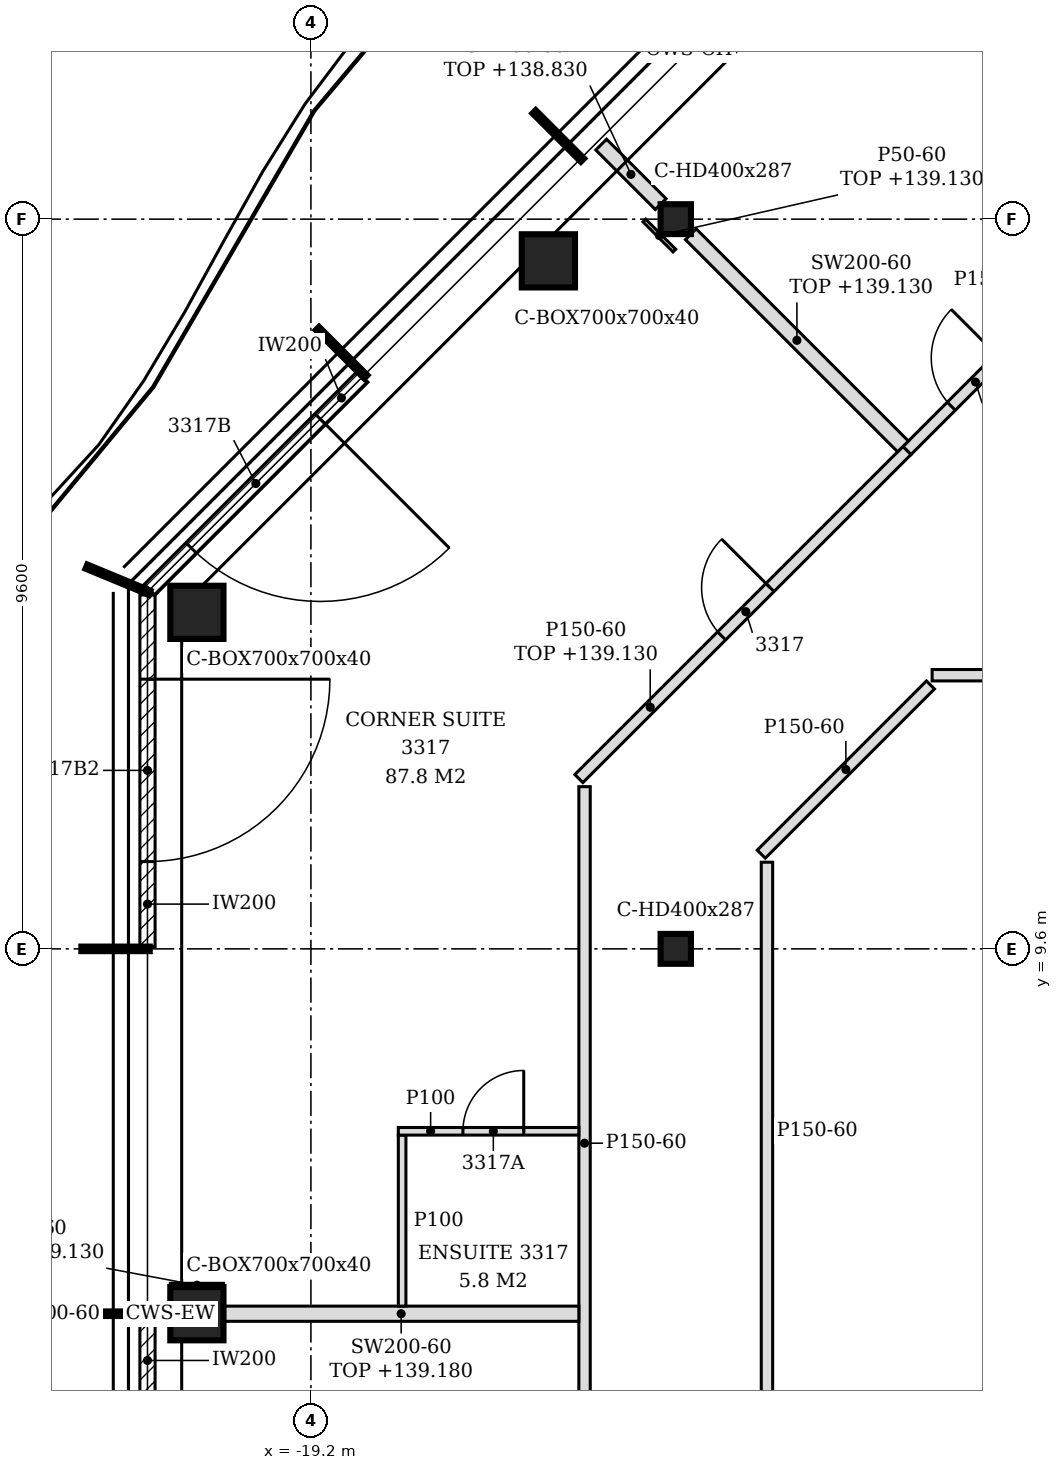
"""IFC4 building model, lengths in metres.
Left out: names, types, materials, properties, quantities, classifications, styles, units other than length and angle.
Written with IfcOpenShell. Run it as: python <this file> out.ifc"""

import sys

from ifc_helpers import new_model, si_unit, direction, frame, frame_2d, origin, origin_2d, place, context, subcontext, project, spatial, polyline, rectangle, hollow_rectangle, i_section, outline, extrude, element, fill, save


model = new_model("IFC4")
c1 = context("Model", 3, precision=1e-05, world=origin(), true_north=direction((0.0, 1.0)))
c2 = subcontext(c1, "Body", "Model", "MODEL_VIEW")
j1 = project(units=[si_unit("LENGTHUNIT", "METRE"), si_unit("PLANEANGLEUNIT", "RADIAN")], contexts=[c1])
p1 = place(None, origin())
s1 = spatial("IfcSite", under=j1, at=p1, CompositionType="ELEMENT")
p2 = place(p1, origin())
s2 = spatial("IfcBuilding", under=s1, at=p2, CompositionType="ELEMENT")
p3 = place(p2, frame((0.0, 0.0, 136.2)))
s3 = spatial("IfcBuildingStorey", under=s2, at=p3, CompositionType="ELEMENT", Elevation=136.2)
for number, where, z_axis, x_axis in (
    (1, (-16.076, 18.652, -0.15), (0.0, 0.0, 1.0), (1.0, 0.0, 0.0)),
    (2, (-20.7, 14.027, -0.15), (0.0, 0.0, 1.0), (1.0, 0.0, 0.0)),
    (3, (-20.7, 4.8, -0.15), (0.0, 0.0, 1.0), (1.0, 0.0, 0.0)),
):
    element("IfcColumn", number, at=place(p3, frame(where, z_axis=z_axis, x_axis=x_axis)), inside=s3, PredefinedType="COLUMN", context=c2, shape_type="SweptSolid", body=[
        extrude(hollow_rectangle(XDim=0.7, YDim=0.7, WallThickness=0.04, at=origin_2d()), origin(), (0.0, 0.0, 1.0), 3.6),
    ])
for number, where, z_axis, x_axis in (
    (4, (-14.4, 9.6, -0.15), (0.0, 0.0, 1.0), (1.0, 0.0, 0.0)),
    (5, (-14.4, 19.2, -0.15), (0.0, 0.0, 1.0), (1.0, 0.0, 0.0)),
):
    element("IfcColumn", number, at=place(p3, frame(where, z_axis=z_axis, x_axis=x_axis)), inside=s3, PredefinedType="COLUMN", context=c2, shape_type="SweptSolid", body=[
        extrude(i_section(OverallWidth=0.399, OverallDepth=0.393, WebThickness=0.023, FlangeThickness=0.037, FilletRadius=0.015, at=origin_2d()), origin(), (0.0, 0.0, 1.0), 3.6),
    ])
p4 = place(p3, frame((-18.521, 17.126, 0.0), z_axis=(0.0, 0.0, 1.0), x_axis=(-0.707106781187, -0.707106781187, 0.0)))
e6 = element("IfcWall", 6, at=p4, inside=s3, PredefinedType="NOTDEFINED", context=c2, shape_type="SweptSolid", body=[
    extrude(rectangle(XDim=3.962, YDim=0.2, at=frame_2d((1.981, 0.0))), origin(), (0.0, 0.0, 1.0), 3.45),
])
p5 = place(p4, frame((0.786, 0.0, 0.0)))
e7 = element("IfcOpeningElement", 7, at=p5, cuts=e6, PredefinedType="OPENING", context=c2, shape_type="SweptSolid", body=[
    extrude(rectangle(XDim=2.4, YDim=2.4, at=frame_2d((1.2, 1.2))), frame((0.0, 0.11, 0.0), z_axis=(0.0, -1.0, 0.0), x_axis=(1.0, 0.0, 0.0)), (0.0, 0.0, 1.0), 0.22),
])
p6 = place(p3, frame((-21.35, 14.256, 0.0), z_axis=(0.0, 0.0, 1.0), x_axis=(0.0, -1.0, 0.0)))
e8 = element("IfcWall", 8, at=p6, inside=s3, PredefinedType="NOTDEFINED", context=c2, shape_type="SweptSolid", body=[
    extrude(rectangle(XDim=4.626, YDim=0.2, at=frame_2d((2.313, 0.0))), origin(), (0.0, 0.0, 1.0), 3.45),
])
p7 = place(p6, frame((1.108, 0.0, 0.0)))
e9 = element("IfcOpeningElement", 9, at=p7, cuts=e8, PredefinedType="OPENING", context=c2, shape_type="SweptSolid", body=[
    extrude(rectangle(XDim=2.4, YDim=2.4, at=frame_2d((1.2, 1.2))), frame((0.0, 0.11, 0.0), z_axis=(0.0, -1.0, 0.0), x_axis=(1.0, 0.0, 0.0)), (0.0, 0.0, 1.0), 0.22),
])
p8 = place(p3, frame((-21.35, 4.77, 0.0), z_axis=(0.0, 0.0, 1.0), x_axis=(0.0, -1.0, 0.0)))
e10 = element("IfcWall", 10, at=p8, inside=s3, PredefinedType="NOTDEFINED", context=c2, shape_type="SweptSolid", body=[
    extrude(rectangle(XDim=4.74, YDim=0.2, at=frame_2d((2.37, 0.0))), origin(), (0.0, 0.0, 1.0), 3.45),
])
p9 = place(p8, frame((1.17, 0.0, 0.0)))
e11 = element("IfcOpeningElement", 11, at=p9, cuts=e10, PredefinedType="OPENING", context=c2, shape_type="SweptSolid", body=[
    extrude(rectangle(XDim=2.4, YDim=2.4, at=frame_2d((1.2, 1.2))), frame((0.0, 0.11, 0.0), z_axis=(0.0, -1.0, 0.0), x_axis=(1.0, 0.0, 0.0)), (0.0, 0.0, 1.0), 0.22),
])
p10 = place(p3, frame((-15.6, -1.1, 0.0), z_axis=(0.0, 0.0, 1.0), x_axis=(0.0, 1.0, 0.0)))
e12 = element("IfcWall", 12, at=p10, inside=s3, PredefinedType="PARTITIONING", context=c2, shape_type="SweptSolid", body=[
    extrude(outline(polyline([(0.0, 0.0), (12.834, 0.0), (12.834, 3.45), (10.795, 3.45), (10.793, 2.98), (10.605, 2.98), (10.603, 3.45), (5.995, 3.45), (5.993, 2.98), (5.805, 2.98), (5.803, 3.45), (1.195, 3.45), (1.193, 2.98), (1.005, 2.98), (1.003, 3.45), (0.0, 3.45), (0.0, 0.0)])), frame((0.0, 0.075, 0.0), z_axis=(0.0, -1.0, 0.0), x_axis=(1.0, 0.0, 0.0)), (0.0, 0.0, 1.0), 0.15),
])
p11 = place(p10, frame((2.553, 0.0, 0.0)))
e13 = element("IfcOpeningElement", 13, at=p11, cuts=e12, PredefinedType="OPENING", context=c2, shape_type="SweptSolid", body=[
    extrude(rectangle(XDim=0.9, YDim=2.1, at=frame_2d((0.45, 1.05))), frame((0.0, 0.085, 0.0), z_axis=(0.0, -1.0, 0.0), x_axis=(1.0, 0.0, 0.0)), (0.0, 0.0, 1.0), 0.17),
])
p12 = place(p3, frame((-13.2, 3.675, 0.0), z_axis=(0.0, 0.0, 1.0), x_axis=(0.0, 1.0, 0.0)))
e14 = element("IfcWall", 14, at=p12, inside=s3, PredefinedType="PARTITIONING", context=c2, shape_type="SweptSolid", body=[
    extrude(outline(polyline([(0.0, 0.0), (7.065, 0.0), (7.065, 3.45), (6.025, 3.45), (6.023, 2.93), (5.825, 2.93), (5.823, 3.45), (1.225, 3.45), (1.223, 2.93), (1.025, 2.93), (1.023, 3.45), (0.0, 3.45), (0.0, 0.0)])), frame((0.0, 0.075, 0.0), z_axis=(0.0, -1.0, 0.0), x_axis=(1.0, 0.0, 0.0)), (0.0, 0.0, 1.0), 0.15),
])
p13 = place(p3, frame((-21.25, 4.8, 0.0), z_axis=(0.0, 0.0, 1.0), x_axis=(1.0, 0.0, 0.0)))
e15 = element("IfcWall", 15, at=p13, inside=s3, PredefinedType="PARTITIONING", context=c2, shape_type="SweptSolid", body=[
    extrude(rectangle(XDim=0.2, YDim=0.2, at=frame_2d((0.1, 0.0))), origin(), (0.0, 0.0, 1.0), 3.45),
])
p14 = place(p3, frame((-20.35, 4.8, 0.0), z_axis=(0.0, 0.0, 1.0), x_axis=(1.0, 0.0, 0.0)))
e16 = element("IfcWall", 16, at=p14, inside=s3, PredefinedType="PARTITIONING", context=c2, shape_type="SweptSolid", body=[
    extrude(rectangle(XDim=4.675, YDim=0.2, at=frame_2d((2.337, 0.0))), origin(), (0.0, 0.0, 1.0), 2.98),
])
p15 = place(p3, frame((-18.0, 4.9, 0.0), z_axis=(0.0, 0.0, 1.0), x_axis=(0.0, 1.0, 0.0)))
e17 = element("IfcWall", 17, at=p15, inside=s3, PredefinedType="PARTITIONING", context=c2, shape_type="SweptSolid", body=[
    extrude(rectangle(XDim=2.25, YDim=0.1, at=frame_2d((1.125, 0.0))), origin(), (0.0, 0.0, 1.0), 3.45),
])
p16 = place(p3, frame((-18.05, 7.2, 0.0), z_axis=(0.0, 0.0, 1.0), x_axis=(1.0, 0.0, 0.0)))
e18 = element("IfcWall", 18, at=p16, inside=s3, PredefinedType="PARTITIONING", context=c2, shape_type="SweptSolid", body=[
    extrude(rectangle(XDim=2.375, YDim=0.1, at=frame_2d((1.188, 0.0))), origin(), (0.0, 0.0, 1.0), 3.45),
])
p17 = place(p16, frame((0.85, 0.0, 0.0)))
e19 = element("IfcOpeningElement", 19, at=p17, cuts=e18, PredefinedType="OPENING", context=c2, shape_type="SweptSolid", body=[
    extrude(rectangle(XDim=0.8, YDim=2.1, at=frame_2d((0.4, 1.05))), frame((0.0, 0.06, 0.0), z_axis=(0.0, -1.0, 0.0), x_axis=(1.0, 0.0, 0.0)), (0.0, 0.0, 1.0), 0.12),
])
p18 = place(p3, frame((-13.275, 10.846, 0.0), z_axis=(0.0, 0.0, 1.0), x_axis=(0.707068002674, 0.707145557572, 0.0)))
e20 = element("IfcWall", 20, at=p18, inside=s3, PredefinedType="PARTITIONING", context=c2, shape_type="SweptSolid", body=[
    extrude(rectangle(XDim=3.148, YDim=0.15, at=frame_2d((1.574, 0.0))), origin(), (0.0, 0.0, 1.0), 3.45),
])
p19 = place(p3, frame((-15.675, 11.84, 0.0), z_axis=(0.0, 0.0, 1.0), x_axis=(0.707206735496, 0.707006812746, 0.0)))
e21 = element("IfcWall", 21, at=p19, inside=s3, PredefinedType="PARTITIONING", context=c2, shape_type="SweptSolid", body=[
    extrude(rectangle(XDim=6.106, YDim=0.15, at=frame_2d((3.053, 0.0))), origin(), (0.0, 0.0, 1.0), 2.93),
])
p20 = place(p19, frame((2.656, 0.0, 0.0)))
e22 = element("IfcOpeningElement", 22, at=p20, cuts=e21, PredefinedType="OPENING", context=c2, shape_type="SweptSolid", body=[
    extrude(rectangle(XDim=0.9, YDim=2.1, at=frame_2d((0.45, 1.05))), frame((0.0, 0.085, 0.0), z_axis=(0.0, -1.0, 0.0), x_axis=(1.0, 0.0, 0.0)), (0.0, 0.0, 1.0), 0.17),
])
p21 = place(p3, frame((-11.027, 13.2, 0.0), z_axis=(0.0, 0.0, 1.0), x_axis=(1.0, 0.0, 0.0)))
e23 = element("IfcWall", 23, at=p21, inside=s3, PredefinedType="PARTITIONING", context=c2, shape_type="SweptSolid", body=[
    extrude(rectangle(XDim=4.212, YDim=0.15, at=frame_2d((2.106, 0.0))), origin(), (0.0, 0.0, 1.0), 3.45),
])
p22 = place(p3, frame((-11.357, 16.157, 0.0), z_axis=(0.0, 0.0, 1.0), x_axis=(0.707106781187, 0.707106781187, 0.0)))
e24 = element("IfcWall", 24, at=p22, inside=s3, PredefinedType="PARTITIONING", context=c2, shape_type="SweptSolid", body=[
    extrude(rectangle(XDim=3.071, YDim=0.15, at=frame_2d((1.535, 0.0))), origin(), (0.0, 0.0, 1.0), 3.45),
])
p23 = place(p22, frame((0.823, 0.0, 0.0)))
e25 = element("IfcOpeningElement", 25, at=p23, cuts=e24, PredefinedType="OPENING", context=c2, shape_type="SweptSolid", body=[
    extrude(rectangle(XDim=0.9, YDim=2.1, at=frame_2d((0.45, 1.05))), frame((0.0, 0.085, 0.0), z_axis=(0.0, -1.0, 0.0), x_axis=(1.0, 0.0, 0.0)), (0.0, 0.0, 1.0), 0.17),
])
p24 = place(p3, frame((-11.41, 16.21, 0.0), z_axis=(0.0, 0.0, 1.0), x_axis=(-0.707106781187, 0.707106781187, 0.0)))
e26 = element("IfcWall", 26, at=p24, inside=s3, PredefinedType="PARTITIONING", context=c2, shape_type="SweptSolid", body=[
    extrude(rectangle(XDim=3.948, YDim=0.2, at=frame_2d((1.974, 0.0))), origin(), (0.0, 0.0, 1.0), 2.93),
])
p25 = place(p3, frame((-14.598, 19.398, 0.0), z_axis=(0.0, 0.0, 1.0), x_axis=(-0.707106781187, 0.707106781187, 0.0)))
e27 = element("IfcWall", 27, at=p25, inside=s3, PredefinedType="PARTITIONING", context=c2, shape_type="SweptSolid", body=[
    extrude(rectangle(XDim=1.107, YDim=0.2, at=frame_2d((0.554, 0.0))), origin(), (0.0, 0.0, 1.0), 2.63),
])
p26 = place(p3, frame((-9.542, 21.367, 0.0), z_axis=(0.0, 0.0, 1.0), x_axis=(-0.707217500167, 0.706996044867, 0.0)))
e28 = element("IfcWall", 28, at=p26, inside=s3, PredefinedType="PARTITIONING", context=c2, shape_type="SweptSolid", body=[
    extrude(rectangle(XDim=2.205, YDim=0.2, at=frame_2d((1.103, 0.0))), origin(), (0.0, 0.0, 1.0), 3.45),
])
p27 = place(p3, frame((-21.05, 5.175, 0.0), z_axis=(0.0, 0.0, 1.0), x_axis=(1.0, 0.0, 0.0)))
e29 = element("IfcWall", 29, at=p27, inside=s3, PredefinedType="PARTITIONING", context=c2, shape_type="SweptSolid", body=[
    extrude(rectangle(XDim=0.7, YDim=0.05, at=frame_2d((0.35, 0.0))), origin(), (0.0, 0.0, 1.0), 2.93),
])
p28 = place(p3, frame((-14.418, 18.786, 0.0), z_axis=(0.0, 0.0, 1.0), x_axis=(-0.707106781187, 0.707106781187, 0.0)))
e30 = element("IfcWall", 30, at=p28, inside=s3, PredefinedType="PARTITIONING", context=c2, shape_type="SweptSolid", body=[
    extrude(rectangle(XDim=0.56, YDim=0.05, at=frame_2d((0.28, 0.0))), origin(), (0.0, 0.0, 1.0), 2.93),
])
p29 = place(p5, origin())
e31 = element("IfcDoor", 31, at=p29, inside=s3, OperationType="SINGLE_SWING_LEFT", PredefinedType="DOOR", context=c2, shape_type="SweptSolid", body=[
    extrude(rectangle(XDim=2.4, YDim=2.4, at=frame_2d((1.2, 1.2))), frame((0.0, 0.025, 0.0), z_axis=(0.0, -1.0, 0.0), x_axis=(1.0, 0.0, 0.0)), (0.0, 0.0, 1.0), 0.05),
])
fill(e7, e31)
p30 = place(p7, origin())
e32 = element("IfcDoor", 32, at=p30, inside=s3, OperationType="SINGLE_SWING_LEFT", PredefinedType="DOOR", context=c2, shape_type="SweptSolid", body=[
    extrude(rectangle(XDim=2.4, YDim=2.4, at=frame_2d((1.2, 1.2))), frame((0.0, 0.025, 0.0), z_axis=(0.0, -1.0, 0.0), x_axis=(1.0, 0.0, 0.0)), (0.0, 0.0, 1.0), 0.05),
])
fill(e9, e32)
p31 = place(p23, origin())
e33 = element("IfcDoor", 33, at=p31, inside=s3, OperationType="SINGLE_SWING_RIGHT", PredefinedType="DOOR", context=c2, shape_type="SweptSolid", body=[
    extrude(rectangle(XDim=0.9, YDim=2.1, at=frame_2d((0.45, 1.05))), frame((0.0, 0.025, 0.0), z_axis=(0.0, -1.0, 0.0), x_axis=(1.0, 0.0, 0.0)), (0.0, 0.0, 1.0), 0.05),
])
fill(e25, e33)
p32 = place(p20, origin())
e34 = element("IfcDoor", 34, at=p32, inside=s3, OperationType="SINGLE_SWING_RIGHT", PredefinedType="DOOR", context=c2, shape_type="SweptSolid", body=[
    extrude(rectangle(XDim=0.9, YDim=2.1, at=frame_2d((0.45, 1.05))), frame((0.0, 0.025, 0.0), z_axis=(0.0, -1.0, 0.0), x_axis=(1.0, 0.0, 0.0)), (0.0, 0.0, 1.0), 0.05),
])
fill(e22, e34)
p33 = place(p17, origin())
e35 = element("IfcDoor", 35, at=p33, inside=s3, OperationType="SINGLE_SWING_RIGHT", PredefinedType="DOOR", context=c2, shape_type="SweptSolid", body=[
    extrude(rectangle(XDim=0.8, YDim=2.1, at=frame_2d((0.4, 1.05))), frame((0.0, 0.025, 0.0), z_axis=(0.0, -1.0, 0.0), x_axis=(1.0, 0.0, 0.0)), (0.0, 0.0, 1.0), 0.05),
])
fill(e19, e35)
save(model, sys.argv[1])
